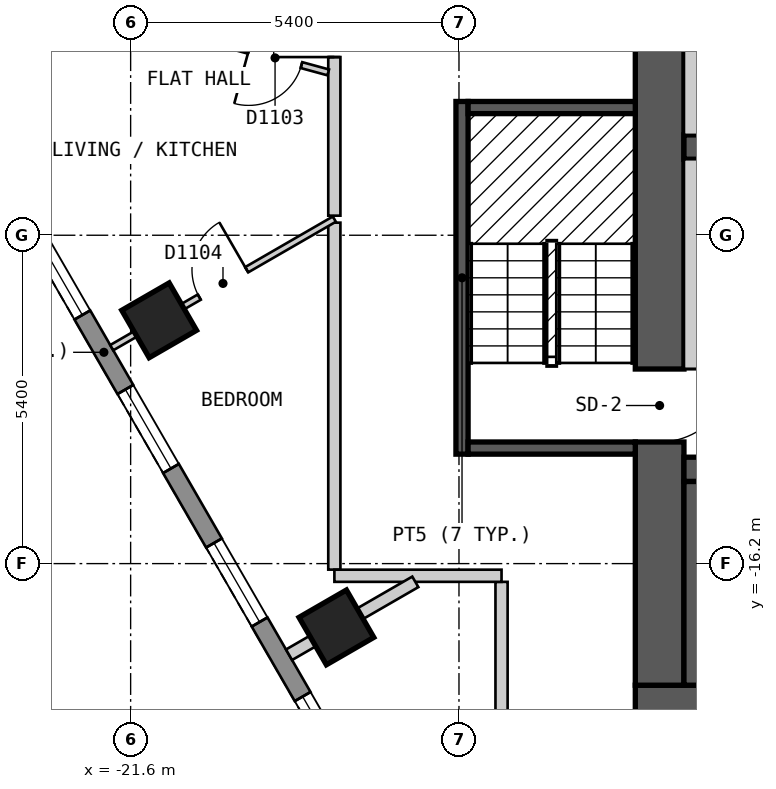
"""IFC4 building model, lengths in metres.
Left out: names, types, materials, properties, quantities, classifications, styles, units other than length and angle.
Written with IfcOpenShell. Run it as: python <this file> out.ifc"""

import sys

from ifc_helpers import new_model, si_unit, direction, frame, frame_2d, origin, origin_2d, place, context, subcontext, project, spatial, polyline, rectangle, outline, extrude, element, fill, save


model = new_model("IFC4")
c1 = context("Model", 3, precision=1e-05, world=origin(), true_north=direction((0.0, 1.0)))
c2 = subcontext(c1, "Body", "Model", "MODEL_VIEW")
j1 = project(units=[si_unit("LENGTHUNIT", "METRE"), si_unit("PLANEANGLEUNIT", "RADIAN")], contexts=[c1])
p1 = place(None, origin())
s1 = spatial("IfcSite", under=j1, at=p1, CompositionType="ELEMENT")
p2 = place(p1, origin())
s2 = spatial("IfcBuilding", under=s1, at=p2, CompositionType="ELEMENT")
p3 = place(p2, frame((0.0, 0.0, 138.6)))
s3 = spatial("IfcBuildingStorey", under=s2, at=p3, CompositionType="ELEMENT", Elevation=138.6)
for number, where, z_axis, x_axis in (
    (1, (-21.131, -12.199, 0.0), (0.0, 0.0, 1.0), (0.5, -0.866, 0.0)),
    (2, (-18.216, -17.249, 0.0), (0.0, 0.0, 1.0), (0.5, -0.866, 0.0)),
):
    element("IfcColumn", number, at=place(p3, frame(where, z_axis=z_axis, x_axis=x_axis)), inside=s3, PredefinedType="COLUMN", context=c2, shape_type="SweptSolid", body=[
        extrude(rectangle(XDim=0.9, YDim=0.9, at=origin_2d()), origin(), (0.0, 0.0, 1.0), 3.0),
    ])
p4 = place(p3, frame((-13.3, -18.6, 0.0), z_axis=(0.0, 0.0, 1.0), x_axis=(1.0, 0.0, 0.0)))
e3 = element("IfcWall", 3, at=p4, inside=s3, PredefinedType="SHEAR", context=c2, shape_type="SweptSolid", body=[
    extrude(rectangle(XDim=26.6, YDim=0.8, at=frame_2d((13.3, 0.0))), origin(), (0.0, 0.0, 1.0), 2.7),
])
p5 = place(p3, frame((-12.9, -18.2, 0.0), z_axis=(0.0, 0.0, 1.0), x_axis=(0.0, 1.0, 0.0)))
e4 = element("IfcWall", 4, at=p5, inside=s3, PredefinedType="SHEAR", context=c2, shape_type="SweptSolid", body=[
    extrude(rectangle(XDim=12.4, YDim=0.8, at=frame_2d((6.2, 0.0))), origin(), (0.0, 0.0, 1.0), 2.7),
])
p6 = place(p5, frame((4.0, 0.0, 0.0)))
e5 = element("IfcOpeningElement", 5, at=p6, cuts=e4, PredefinedType="OPENING", context=c2, shape_type="SweptSolid", body=[
    extrude(rectangle(XDim=1.2, YDim=2.1, at=frame_2d((0.6, 1.05))), frame((0.0, 0.41, 0.0), z_axis=(0.0, -1.0, 0.0), x_axis=(1.0, 0.0, 0.0)), (0.0, 0.0, 1.0), 0.82),
])
p7 = place(p3, frame((-12.5, -14.65, 0.0), z_axis=(0.0, 0.0, 1.0), x_axis=(1.0, 0.0, 0.0)))
e6 = element("IfcWall", 6, at=p7, inside=s3, PredefinedType="SHEAR", context=c2, shape_type="SweptSolid", body=[
    extrude(rectangle(XDim=25.0, YDim=0.4, at=frame_2d((12.5, 0.0))), origin(), (0.0, 0.0, 1.0), 2.7),
])
p8 = place(p7, frame((1.7, 0.0, 0.0), z_axis=(0.0, 0.0, 1.0), x_axis=(-1.0, 0.0, 0.0)))
e7 = element("IfcOpeningElement", 7, at=p8, cuts=e6, PredefinedType="OPENING", context=c2, shape_type="SweptSolid", body=[
    extrude(rectangle(XDim=1.2, YDim=2.1, at=frame_2d((0.6, 1.05))), frame((0.0, 0.21, 0.0), z_axis=(0.0, -1.0, 0.0), x_axis=(1.0, 0.0, 0.0)), (0.0, 0.0, 1.0), 0.42),
])
p9 = place(p7, frame((24.55, 0.0, 0.0), z_axis=(0.0, 0.0, 1.0), x_axis=(-1.0, 0.0, 0.0)))
e8 = element("IfcOpeningElement", 8, at=p9, cuts=e6, PredefinedType="OPENING", context=c2, shape_type="SweptSolid", body=[
    extrude(rectangle(XDim=1.2, YDim=2.1, at=frame_2d((0.6, 1.05))), frame((0.0, 0.21, 0.0), z_axis=(0.0, -1.0, 0.0), x_axis=(1.0, 0.0, 0.0)), (0.0, 0.0, 1.0), 0.42),
])
p10 = place(p7, frame((7.6, 0.0, 0.0), z_axis=(0.0, 0.0, 1.0), x_axis=(-1.0, 0.0, 0.0)))
e9 = element("IfcOpeningElement", 9, at=p10, cuts=e6, PredefinedType="OPENING", context=c2, shape_type="SweptSolid", body=[
    extrude(rectangle(XDim=0.9, YDim=2.1, at=frame_2d((0.45, 1.05))), frame((0.0, 0.21, 0.0), z_axis=(0.0, -1.0, 0.0), x_axis=(1.0, 0.0, 0.0)), (0.0, 0.0, 1.0), 0.42),
])
p11 = place(p7, frame((9.65, 0.0, 0.0), z_axis=(0.0, 0.0, 1.0), x_axis=(-1.0, 0.0, 0.0)))
e10 = element("IfcOpeningElement", 10, at=p11, cuts=e6, PredefinedType="OPENING", context=c2, shape_type="SweptSolid", body=[
    extrude(rectangle(XDim=0.9, YDim=2.1, at=frame_2d((0.45, 1.05))), frame((0.0, 0.21, 0.0), z_axis=(0.0, -1.0, 0.0), x_axis=(1.0, 0.0, 0.0)), (0.0, 0.0, 1.0), 0.42),
])
p12 = place(p7, frame((11.95, 0.0, 0.0), z_axis=(0.0, 0.0, 1.0), x_axis=(-1.0, 0.0, 0.0)))
e11 = element("IfcOpeningElement", 11, at=p12, cuts=e6, PredefinedType="OPENING", context=c2, shape_type="SweptSolid", body=[
    extrude(rectangle(XDim=1.0, YDim=2.1, at=frame_2d((0.5, 1.05))), frame((0.0, 0.21, 0.0), z_axis=(0.0, -1.0, 0.0), x_axis=(1.0, 0.0, 0.0)), (0.0, 0.0, 1.0), 0.42),
])
p13 = place(p7, frame((14.15, 0.0, 0.0), z_axis=(0.0, 0.0, 1.0), x_axis=(-1.0, 0.0, 0.0)))
e12 = element("IfcOpeningElement", 12, at=p13, cuts=e6, PredefinedType="OPENING", context=c2, shape_type="SweptSolid", body=[
    extrude(rectangle(XDim=0.9, YDim=2.1, at=frame_2d((0.45, 1.05))), frame((0.0, 0.21, 0.0), z_axis=(0.0, -1.0, 0.0), x_axis=(1.0, 0.0, 0.0)), (0.0, 0.0, 1.0), 0.42),
])
p14 = place(p7, frame((16.15, 0.0, 0.0), z_axis=(0.0, 0.0, 1.0), x_axis=(-1.0, 0.0, 0.0)))
e13 = element("IfcOpeningElement", 13, at=p14, cuts=e6, PredefinedType="OPENING", context=c2, shape_type="SweptSolid", body=[
    extrude(rectangle(XDim=0.9, YDim=2.1, at=frame_2d((0.45, 1.05))), frame((0.0, 0.21, 0.0), z_axis=(0.0, -1.0, 0.0), x_axis=(1.0, 0.0, 0.0)), (0.0, 0.0, 1.0), 0.42),
])
p15 = place(p7, frame((18.3, 0.0, 0.0), z_axis=(0.0, 0.0, 1.0), x_axis=(-1.0, 0.0, 0.0)))
e14 = element("IfcOpeningElement", 14, at=p15, cuts=e6, PredefinedType="OPENING", context=c2, shape_type="SweptSolid", body=[
    extrude(rectangle(XDim=1.0, YDim=2.1, at=frame_2d((0.5, 1.05))), frame((0.0, 0.21, 0.0), z_axis=(0.0, -1.0, 0.0), x_axis=(1.0, 0.0, 0.0)), (0.0, 0.0, 1.0), 0.42),
])
p16 = place(p3, frame((-12.5, -9.35, 0.0), z_axis=(0.0, 0.0, 1.0), x_axis=(1.0, 0.0, 0.0)))
e15 = element("IfcWall", 15, at=p16, inside=s3, PredefinedType="SHEAR", context=c2, shape_type="SweptSolid", body=[
    extrude(rectangle(XDim=22.7, YDim=0.4, at=frame_2d((11.35, 0.0))), origin(), (0.0, 0.0, 1.0), 2.7),
])
p17 = place(p16, frame((1.1, 0.0, 0.0)))
e16 = element("IfcOpeningElement", 16, at=p17, cuts=e15, PredefinedType="OPENING", context=c2, shape_type="SweptSolid", body=[
    extrude(rectangle(XDim=1.1, YDim=2.1, at=frame_2d((0.55, 1.05))), frame((0.0, 0.21, 0.0), z_axis=(0.0, -1.0, 0.0), x_axis=(1.0, 0.0, 0.0)), (0.0, 0.0, 1.0), 0.42),
])
p18 = place(p16, frame((3.9, 0.0, 0.0)))
e17 = element("IfcOpeningElement", 17, at=p18, cuts=e15, PredefinedType="OPENING", context=c2, shape_type="SweptSolid", body=[
    extrude(rectangle(XDim=1.1, YDim=2.1, at=frame_2d((0.55, 1.05))), frame((0.0, 0.21, 0.0), z_axis=(0.0, -1.0, 0.0), x_axis=(1.0, 0.0, 0.0)), (0.0, 0.0, 1.0), 0.42),
])
p19 = place(p16, frame((6.7, 0.0, 0.0)))
e18 = element("IfcOpeningElement", 18, at=p19, cuts=e15, PredefinedType="OPENING", context=c2, shape_type="SweptSolid", body=[
    extrude(rectangle(XDim=1.1, YDim=2.1, at=frame_2d((0.55, 1.05))), frame((0.0, 0.21, 0.0), z_axis=(0.0, -1.0, 0.0), x_axis=(1.0, 0.0, 0.0)), (0.0, 0.0, 1.0), 0.42),
])
p20 = place(p16, frame((9.0, 0.0, 0.0)))
e19 = element("IfcOpeningElement", 19, at=p20, cuts=e15, PredefinedType="OPENING", context=c2, shape_type="SweptSolid", body=[
    extrude(rectangle(XDim=1.1, YDim=2.1, at=frame_2d((0.55, 1.05))), frame((0.0, 0.21, 0.0), z_axis=(0.0, -1.0, 0.0), x_axis=(1.0, 0.0, 0.0)), (0.0, 0.0, 1.0), 0.42),
])
p21 = place(p16, frame((11.3, 0.0, 0.0)))
e20 = element("IfcOpeningElement", 20, at=p21, cuts=e15, PredefinedType="OPENING", context=c2, shape_type="SweptSolid", body=[
    extrude(rectangle(XDim=1.1, YDim=2.1, at=frame_2d((0.55, 1.05))), frame((0.0, 0.21, 0.0), z_axis=(0.0, -1.0, 0.0), x_axis=(1.0, 0.0, 0.0)), (0.0, 0.0, 1.0), 0.42),
])
p22 = place(p16, frame((13.6, 0.0, 0.0)))
e21 = element("IfcOpeningElement", 21, at=p22, cuts=e15, PredefinedType="OPENING", context=c2, shape_type="SweptSolid", body=[
    extrude(rectangle(XDim=1.1, YDim=2.1, at=frame_2d((0.55, 1.05))), frame((0.0, 0.21, 0.0), z_axis=(0.0, -1.0, 0.0), x_axis=(1.0, 0.0, 0.0)), (0.0, 0.0, 1.0), 0.42),
])
p23 = place(p16, frame((15.9, 0.0, 0.0)))
e22 = element("IfcOpeningElement", 22, at=p23, cuts=e15, PredefinedType="OPENING", context=c2, shape_type="SweptSolid", body=[
    extrude(rectangle(XDim=1.1, YDim=2.1, at=frame_2d((0.55, 1.05))), frame((0.0, 0.21, 0.0), z_axis=(0.0, -1.0, 0.0), x_axis=(1.0, 0.0, 0.0)), (0.0, 0.0, 1.0), 0.42),
])
p24 = place(p16, frame((18.2, 0.0, 0.0)))
e23 = element("IfcOpeningElement", 23, at=p24, cuts=e15, PredefinedType="OPENING", context=c2, shape_type="SweptSolid", body=[
    extrude(rectangle(XDim=1.1, YDim=2.1, at=frame_2d((0.55, 1.05))), frame((0.0, 0.21, 0.0), z_axis=(0.0, -1.0, 0.0), x_axis=(1.0, 0.0, 0.0)), (0.0, 0.0, 1.0), 0.42),
])
p25 = place(p16, frame((20.6, 0.0, 0.0)))
e24 = element("IfcOpeningElement", 24, at=p25, cuts=e15, PredefinedType="OPENING", context=c2, shape_type="SweptSolid", body=[
    extrude(rectangle(XDim=1.1, YDim=2.1, at=frame_2d((0.55, 1.05))), frame((0.0, 0.21, 0.0), z_axis=(0.0, -1.0, 0.0), x_axis=(1.0, 0.0, 0.0)), (0.0, 0.0, 1.0), 0.42),
])
p26 = place(p3, frame((-28.218, -2.025, 0.0), z_axis=(0.0, 0.0, 1.0), x_axis=(0.500017503135, -0.866015298109, 0.0)))
e25 = element("IfcWall", 25, at=p26, inside=s3, PredefinedType="SOLIDWALL", context=c2, shape_type="SweptSolid", body=[
    extrude(outline(polyline([(0.0, -0.15), (24.711, -0.15), (24.631, 0.15), (0.08, 0.15), (0.0, -0.15)])), origin(), (0.0, 0.0, 1.0), 2.7),
])
p27 = place(p26, frame((1.4, 0.0, 0.15)))
e26 = element("IfcOpeningElement", 26, at=p27, cuts=e25, PredefinedType="OPENING", context=c2, shape_type="SweptSolid", body=[
    extrude(rectangle(XDim=1.5, YDim=2.1, at=frame_2d((0.75, 1.05))), frame((0.0, 0.16, 0.0), z_axis=(0.0, -1.0, 0.0), x_axis=(1.0, 0.0, 0.0)), (0.0, 0.0, 1.0), 0.32),
])
p28 = place(p26, frame((4.316, 0.0, 0.15)))
e27 = element("IfcOpeningElement", 27, at=p28, cuts=e25, PredefinedType="OPENING", context=c2, shape_type="SweptSolid", body=[
    extrude(rectangle(XDim=1.5, YDim=2.1, at=frame_2d((0.75, 1.05))), frame((0.0, 0.16, 0.0), z_axis=(0.0, -1.0, 0.0), x_axis=(1.0, 0.0, 0.0)), (0.0, 0.0, 1.0), 0.32),
])
p29 = place(p26, frame((7.231, 0.0, 0.15)))
e28 = element("IfcOpeningElement", 28, at=p29, cuts=e25, PredefinedType="OPENING", context=c2, shape_type="SweptSolid", body=[
    extrude(rectangle(XDim=1.5, YDim=2.1, at=frame_2d((0.75, 1.05))), frame((0.0, 0.16, 0.0), z_axis=(0.0, -1.0, 0.0), x_axis=(1.0, 0.0, 0.0)), (0.0, 0.0, 1.0), 0.32),
])
p30 = place(p26, frame((10.147, 0.0, 0.15)))
e29 = element("IfcOpeningElement", 29, at=p30, cuts=e25, PredefinedType="OPENING", context=c2, shape_type="SweptSolid", body=[
    extrude(rectangle(XDim=1.5, YDim=2.1, at=frame_2d((0.75, 1.05))), frame((0.0, 0.16, 0.0), z_axis=(0.0, -1.0, 0.0), x_axis=(1.0, 0.0, 0.0)), (0.0, 0.0, 1.0), 0.32),
])
p31 = place(p26, frame((13.062, 0.0, 0.15)))
e30 = element("IfcOpeningElement", 30, at=p31, cuts=e25, PredefinedType="OPENING", context=c2, shape_type="SweptSolid", body=[
    extrude(rectangle(XDim=1.5, YDim=2.1, at=frame_2d((0.75, 1.05))), frame((0.0, 0.16, 0.0), z_axis=(0.0, -1.0, 0.0), x_axis=(1.0, 0.0, 0.0)), (0.0, 0.0, 1.0), 0.32),
])
p32 = place(p26, frame((15.977, 0.0, 0.15)))
e31 = element("IfcOpeningElement", 31, at=p32, cuts=e25, PredefinedType="OPENING", context=c2, shape_type="SweptSolid", body=[
    extrude(rectangle(XDim=1.5, YDim=2.1, at=frame_2d((0.75, 1.05))), frame((0.0, 0.16, 0.0), z_axis=(0.0, -1.0, 0.0), x_axis=(1.0, 0.0, 0.0)), (0.0, 0.0, 1.0), 0.32),
])
p33 = place(p26, frame((18.893, 0.0, 0.15)))
e32 = element("IfcOpeningElement", 32, at=p33, cuts=e25, PredefinedType="OPENING", context=c2, shape_type="SweptSolid", body=[
    extrude(rectangle(XDim=1.5, YDim=2.1, at=frame_2d((0.75, 1.05))), frame((0.0, 0.16, 0.0), z_axis=(0.0, -1.0, 0.0), x_axis=(1.0, 0.0, 0.0)), (0.0, 0.0, 1.0), 0.32),
])
p34 = place(p26, frame((21.809, 0.0, 0.15)))
e33 = element("IfcOpeningElement", 33, at=p34, cuts=e25, PredefinedType="OPENING", context=c2, shape_type="SweptSolid", body=[
    extrude(rectangle(XDim=1.5, YDim=2.1, at=frame_2d((0.75, 1.05))), frame((0.0, 0.16, 0.0), z_axis=(0.0, -1.0, 0.0), x_axis=(1.0, 0.0, 0.0)), (0.0, 0.0, 1.0), 0.32),
])
p35 = place(p3, frame((-15.5, -16.5, 0.0), z_axis=(0.0, 0.0, 1.0), x_axis=(0.0, -1.0, 0.0)))
e34 = element("IfcWall", 34, at=p35, inside=s3, PredefinedType="PARTITIONING", context=c2, shape_type="SweptSolid", body=[
    extrude(rectangle(XDim=4.599, YDim=0.2, at=frame_2d((2.3, 0.0))), origin(), (0.0, 0.0, 1.0), 2.7),
])
p36 = place(p3, frame((-18.25, -10.593, 0.0), z_axis=(0.0, 0.0, 1.0), x_axis=(0.0, -1.0, 0.0)))
e35 = element("IfcWall", 35, at=p36, inside=s3, PredefinedType="PARTITIONING", context=c2, shape_type="SweptSolid", body=[
    extrude(rectangle(XDim=5.706, YDim=0.2, at=frame_2d((2.853, 0.0))), origin(), (0.0, 0.0, 1.0), 2.7),
])
p37 = place(p3, frame((-18.249, -16.4, 0.0), z_axis=(0.0, 0.0, 1.0), x_axis=(1.0, 0.0, 0.0)))
e36 = element("IfcWall", 36, at=p37, inside=s3, PredefinedType="PARTITIONING", context=c2, shape_type="SweptSolid", body=[
    extrude(rectangle(XDim=2.749, YDim=0.2, at=frame_2d((1.375, 0.0))), origin(), (0.0, 0.0, 1.0), 2.7),
])
p38 = place(p3, frame((-18.25, -10.478, 0.0), z_axis=(0.0, 0.0, 1.0), x_axis=(0.0, 1.0, 0.0)))
e37 = element("IfcWall", 37, at=p38, inside=s3, PredefinedType="PARTITIONING", context=c2, shape_type="SweptSolid", body=[
    extrude(rectangle(XDim=3.878, YDim=0.2, at=frame_2d((1.939, 0.0))), origin(), (0.0, 0.0, 1.0), 2.7),
])
p39 = place(p38, frame((2.608, 0.0, 0.0)))
e38 = element("IfcOpeningElement", 38, at=p39, cuts=e37, PredefinedType="OPENING", context=c2, shape_type="SweptSolid", body=[
    extrude(rectangle(XDim=1.0, YDim=2.1, at=frame_2d((0.5, 1.05))), frame((0.0, 0.11, 0.0), z_axis=(0.0, -1.0, 0.0), x_axis=(1.0, 0.0, 0.0)), (0.0, 0.0, 1.0), 0.22),
])
p40 = place(p3, frame((-20.151, -7.631, 0.0), z_axis=(0.0, 0.0, 1.0), x_axis=(0.964784947449, -0.263039930765, 0.0)))
e39 = element("IfcWall", 39, at=p40, inside=s3, PredefinedType="PARTITIONING", context=c2, shape_type="SweptSolid", body=[
    extrude(rectangle(XDim=1.866, YDim=0.1, at=frame_2d((0.933, 0.0))), origin(), (0.0, 0.0, 1.0), 2.7),
])
p41 = place(p40, frame((0.51, 0.0, 0.0)))
e40 = element("IfcOpeningElement", 40, at=p41, cuts=e39, PredefinedType="OPENING", context=c2, shape_type="SweptSolid", body=[
    extrude(rectangle(XDim=0.9, YDim=2.1, at=frame_2d((0.45, 1.05))), frame((0.0, 0.06, 0.0), z_axis=(0.0, -1.0, 0.0), x_axis=(1.0, 0.0, 0.0)), (0.0, 0.0, 1.0), 0.12),
])
p42 = place(p3, frame((-21.911, -12.649, 0.0), z_axis=(0.0, 0.0, 1.0), x_axis=(0.865984571374, 0.500070717141, 0.0)))
e41 = element("IfcWall", 41, at=p42, inside=s3, PredefinedType="PARTITIONING", context=c2, shape_type="SweptSolid", body=[
    extrude(rectangle(XDim=4.228, YDim=0.1, at=frame_2d((2.114, 0.0))), origin(), (0.0, 0.0, 1.0), 2.7),
])
p43 = place(p42, frame((1.663, 0.0, 0.0)))
e42 = element("IfcOpeningElement", 42, at=p43, cuts=e41, PredefinedType="OPENING", context=c2, shape_type="SweptSolid", body=[
    extrude(rectangle(XDim=0.9, YDim=2.1, at=frame_2d((0.45, 1.05))), frame((0.0, 0.06, 0.0), z_axis=(0.0, -1.0, 0.0), x_axis=(1.0, 0.0, 0.0)), (0.0, 0.0, 1.0), 0.12),
])
p44 = place(p3, frame((-18.995, -17.699, 0.0), z_axis=(0.0, 0.0, 1.0), x_axis=(0.86607371389, 0.499916315105, 0.0)))
e43 = element("IfcWall", 43, at=p44, inside=s3, PredefinedType="PARTITIONING", context=c2, shape_type="SweptSolid", body=[
    extrude(rectangle(XDim=2.398, YDim=0.2, at=frame_2d((1.199, 0.0))), origin(), (0.0, 0.0, 1.0), 2.7),
])
p45 = place(p3, frame((-16.15, -14.4, 0.0), z_axis=(0.0, 0.0, 1.0), x_axis=(0.0, 1.0, 0.0)))
e44 = element("IfcWall", 44, at=p45, inside=s3, PredefinedType="SOLIDWALL", context=c2, shape_type="SweptSolid", body=[
    extrude(rectangle(XDim=5.8, YDim=0.2, at=frame_2d((2.9, 0.0))), origin(), (0.0, 0.0, 1.0), 2.7),
])
for number, where, z_axis, x_axis in (
    (45, (-16.05, -14.3, 0.0), (0.0, 0.0, 1.0), (1.0, 0.0, 0.0)),
    (46, (-16.05, -8.7, 0.0), (0.0, 0.0, 1.0), (1.0, 0.0, 0.0)),
):
    element("IfcWall", number, at=place(p3, frame(where, z_axis=z_axis, x_axis=x_axis)), inside=s3, PredefinedType="SOLIDWALL", context=c2, shape_type="SweptSolid", body=[
        extrude(rectangle(XDim=2.75, YDim=0.2, at=frame_2d((1.375, 0.0))), origin(), (0.0, 0.0, 1.0), 2.7),
    ])
p46 = place(p3, frame((-12.3, -18.2, 0.0), z_axis=(0.0, 0.0, 1.0), x_axis=(0.0, 1.0, 0.0)))
e47 = element("IfcWall", 47, at=p46, inside=s3, PredefinedType="SOLIDWALL", context=c2, shape_type="SweptSolid", body=[
    extrude(rectangle(XDim=3.35, YDim=0.4, at=frame_2d((1.675, 0.0))), origin(), (0.0, 0.0, 1.0), 2.7),
])
p47 = place(p3, frame((-12.3, -13.0, 0.0), z_axis=(0.0, 0.0, 1.0), x_axis=(0.0, 1.0, 0.0)))
e48 = element("IfcWall", 48, at=p47, inside=s3, PredefinedType="PARTITIONING", context=c2, shape_type="SweptSolid", body=[
    extrude(rectangle(XDim=3.45, YDim=0.4, at=frame_2d((1.725, 0.0))), origin(), (0.0, 0.0, 1.0), 2.7),
])
p48 = place(p3, frame((-12.3, -9.15, 0.0), z_axis=(0.0, 0.0, 1.0), x_axis=(0.0, 1.0, 0.0)))
e49 = element("IfcWall", 49, at=p48, inside=s3, PredefinedType="SOLIDWALL", context=c2, shape_type="SweptSolid", body=[
    extrude(rectangle(XDim=3.35, YDim=0.4, at=frame_2d((1.675, 0.0))), origin(), (0.0, 0.0, 1.0), 2.7),
])
p49 = place(p30, origin())
e50 = element("IfcWindow", 50, at=p49, inside=s3, PartitioningType="SINGLE_PANEL", PredefinedType="WINDOW", context=c2, shape_type="SweptSolid", body=[
    extrude(rectangle(XDim=1.5, YDim=2.1, at=frame_2d((0.75, 1.05))), frame((0.0, 0.03, 0.0), z_axis=(0.0, -1.0, 0.0), x_axis=(1.0, 0.0, 0.0)), (0.0, 0.0, 1.0), 0.06),
])
fill(e29, e50)
p50 = place(p31, origin())
e51 = element("IfcWindow", 51, at=p50, inside=s3, PartitioningType="SINGLE_PANEL", PredefinedType="WINDOW", context=c2, shape_type="SweptSolid", body=[
    extrude(rectangle(XDim=1.5, YDim=2.1, at=frame_2d((0.75, 1.05))), frame((0.0, 0.03, 0.0), z_axis=(0.0, -1.0, 0.0), x_axis=(1.0, 0.0, 0.0)), (0.0, 0.0, 1.0), 0.06),
])
fill(e30, e51)
p51 = place(p32, origin())
e52 = element("IfcWindow", 52, at=p51, inside=s3, PartitioningType="SINGLE_PANEL", PredefinedType="WINDOW", context=c2, shape_type="SweptSolid", body=[
    extrude(rectangle(XDim=1.5, YDim=2.1, at=frame_2d((0.75, 1.05))), frame((0.0, 0.03, 0.0), z_axis=(0.0, -1.0, 0.0), x_axis=(1.0, 0.0, 0.0)), (0.0, 0.0, 1.0), 0.06),
])
fill(e31, e52)
p52 = place(p33, origin())
e53 = element("IfcWindow", 53, at=p52, inside=s3, PartitioningType="SINGLE_PANEL", PredefinedType="WINDOW", context=c2, shape_type="SweptSolid", body=[
    extrude(rectangle(XDim=1.5, YDim=2.1, at=frame_2d((0.75, 1.05))), frame((0.0, 0.03, 0.0), z_axis=(0.0, -1.0, 0.0), x_axis=(1.0, 0.0, 0.0)), (0.0, 0.0, 1.0), 0.06),
])
fill(e32, e53)
p53 = place(p39, origin())
e54 = element("IfcDoor", 54, at=p53, inside=s3, OperationType="SINGLE_SWING_LEFT", PredefinedType="DOOR", context=c2, shape_type="SweptSolid", body=[
    extrude(rectangle(XDim=1.0, YDim=2.1, at=frame_2d((0.5, 1.05))), frame((0.0, 0.025, 0.0), z_axis=(0.0, -1.0, 0.0), x_axis=(1.0, 0.0, 0.0)), (0.0, 0.0, 1.0), 0.05),
])
fill(e38, e54)
p54 = place(p41, origin())
e55 = element("IfcDoor", 55, at=p54, inside=s3, OperationType="SINGLE_SWING_LEFT", PredefinedType="DOOR", context=c2, shape_type="SweptSolid", body=[
    extrude(rectangle(XDim=0.9, YDim=2.1, at=frame_2d((0.45, 1.05))), frame((0.0, 0.025, 0.0), z_axis=(0.0, -1.0, 0.0), x_axis=(1.0, 0.0, 0.0)), (0.0, 0.0, 1.0), 0.05),
])
fill(e40, e55)
p55 = place(p43, origin())
e56 = element("IfcDoor", 56, at=p55, inside=s3, OperationType="SINGLE_SWING_RIGHT", PredefinedType="DOOR", context=c2, shape_type="SweptSolid", body=[
    extrude(rectangle(XDim=0.9, YDim=2.1, at=frame_2d((0.45, 1.05))), frame((0.0, 0.025, 0.0), z_axis=(0.0, -1.0, 0.0), x_axis=(1.0, 0.0, 0.0)), (0.0, 0.0, 1.0), 0.05),
])
fill(e42, e56)
p56 = place(p6, origin())
e57 = element("IfcDoor", 57, at=p56, inside=s3, OperationType="SINGLE_SWING_RIGHT", PredefinedType="DOOR", context=c2, shape_type="SweptSolid", body=[
    extrude(rectangle(XDim=1.2, YDim=2.1, at=frame_2d((0.6, 1.05))), frame((0.0, 0.025, 0.0), z_axis=(0.0, -1.0, 0.0), x_axis=(1.0, 0.0, 0.0)), (0.0, 0.0, 1.0), 0.05),
])
fill(e5, e57)
save(model, sys.argv[1])
